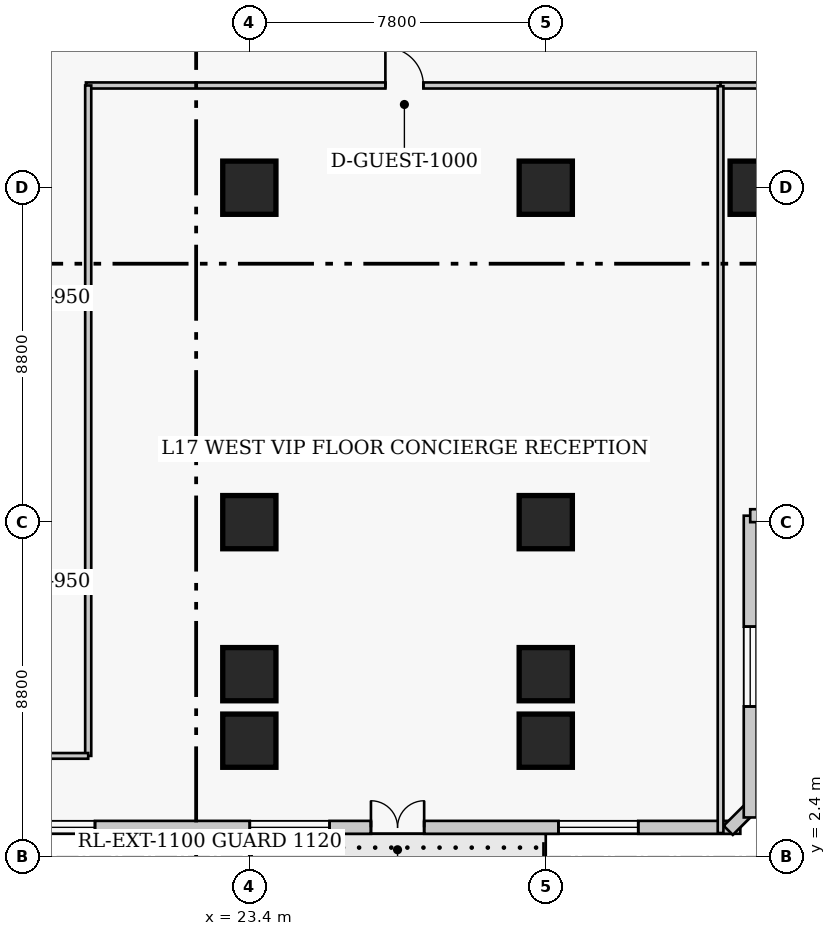
"""IFC4 building model, lengths in metres.
Left out: names, types, materials, properties, quantities, classifications, styles, units other than length and angle.
Written with IfcOpenShell. Run it as: python <this file> out.ifc"""

import sys

from ifc_helpers import new_model, si_unit, direction, frame, frame_2d, origin, origin_2d, place, context, subcontext, project, spatial, rectangle, extrude, element, fill, save


model = new_model("IFC4")
c1 = context("Model", 3, precision=1e-05, world=origin(), true_north=direction((0.0, 1.0)))
c2 = subcontext(c1, "Body", "Model", "MODEL_VIEW")
j1 = project(units=[si_unit("LENGTHUNIT", "METRE"), si_unit("PLANEANGLEUNIT", "RADIAN")], contexts=[c1])
p1 = place(None, origin())
s1 = spatial("IfcSite", under=j1, at=p1, CompositionType="ELEMENT")
p2 = place(p1, origin())
s2 = spatial("IfcBuilding", under=s1, at=p2, CompositionType="ELEMENT")
p3 = place(p2, frame((0.0, 0.0, 71.6)))
s3 = spatial("IfcBuildingStorey", under=s2, at=p3, CompositionType="ELEMENT", Elevation=71.6)
for number, where, z_axis, x_axis in (
    (1, (23.4, 11.2, 0.0), (0.0, 0.0, 1.0), (1.0, 0.0, 0.0)),
    (2, (23.4, 20.0, 0.0), (0.0, 0.0, 1.0), (1.0, 0.0, 0.0)),
    (3, (31.2, 11.2, 0.0), (0.0, 0.0, 1.0), (1.0, 0.0, 0.0)),
    (4, (31.2, 20.0, 0.0), (0.0, 0.0, 1.0), (1.0, 0.0, 0.0)),
    (5, (36.75, 20.0, 0.0), (0.0, 0.0, 1.0), (1.0, 0.0, 0.0)),
    (6, (23.4, 7.2, 0.0), (0.0, 0.0, 1.0), (1.0, 0.0, 0.0)),
    (7, (31.2, 7.2, 0.0), (0.0, 0.0, 1.0), (1.0, 0.0, 0.0)),
    (8, (23.4, 5.45, 0.0), (0.0, 0.0, 1.0), (1.0, 0.0, 0.0)),
    (9, (31.2, 5.45, 0.0), (0.0, 0.0, 1.0), (1.0, 0.0, 0.0)),
):
    element("IfcColumn", number, at=place(p3, frame(where, z_axis=z_axis, x_axis=x_axis)), inside=s3, PredefinedType="COLUMN", context=c2, shape_type="SweptSolid", body=[
        extrude(rectangle(XDim=1.4, YDim=1.4, at=origin_2d()), origin(), (0.0, 0.0, 1.0), 3.8),
    ])
p4 = place(p3, frame((6.43, 3.17, 0.0), z_axis=(0.0, 0.0, 1.0), x_axis=(1.0, 0.0, 0.0)))
e10 = element("IfcWall", 10, at=p4, inside=s3, PredefinedType="SOLIDWALL", context=c2, shape_type="SweptSolid", body=[
    extrude(rectangle(XDim=29.89, YDim=0.34, at=frame_2d((14.945, 0.0))), origin(), (0.0, 0.0, 1.0), 3.42),
])
p5 = place(p4, frame((20.17, 0.0, 0.0)))
e11 = element("IfcOpeningElement", 11, at=p5, cuts=e10, PredefinedType="OPENING", context=c2, shape_type="SweptSolid", body=[
    extrude(rectangle(XDim=1.4, YDim=2.15, at=frame_2d((0.7, 1.075))), frame((0.0, 0.18, 0.0), z_axis=(0.0, -1.0, 0.0), x_axis=(1.0, 0.0, 0.0)), (0.0, 0.0, 1.0), 0.36),
])
p6 = place(p4, frame((2.686, 0.0, 0.85)))
e12 = element("IfcOpeningElement", 12, at=p6, cuts=e10, PredefinedType="OPENING", context=c2, shape_type="SweptSolid", body=[
    extrude(rectangle(XDim=2.1, YDim=1.85, at=frame_2d((1.05, 0.925))), frame((0.0, 0.18, 0.0), z_axis=(0.0, -1.0, 0.0), x_axis=(1.0, 0.0, 0.0)), (0.0, 0.0, 1.0), 0.36),
])
p7 = place(p4, frame((10.809, 0.0, 0.85)))
e13 = element("IfcOpeningElement", 13, at=p7, cuts=e10, PredefinedType="OPENING", context=c2, shape_type="SweptSolid", body=[
    extrude(rectangle(XDim=2.1, YDim=1.85, at=frame_2d((1.05, 0.925))), frame((0.0, 0.18, 0.0), z_axis=(0.0, -1.0, 0.0), x_axis=(1.0, 0.0, 0.0)), (0.0, 0.0, 1.0), 0.36),
])
p8 = place(p4, frame((16.981, 0.0, 0.85)))
e14 = element("IfcOpeningElement", 14, at=p8, cuts=e10, PredefinedType="OPENING", context=c2, shape_type="SweptSolid", body=[
    extrude(rectangle(XDim=2.1, YDim=1.85, at=frame_2d((1.05, 0.925))), frame((0.0, 0.18, 0.0), z_axis=(0.0, -1.0, 0.0), x_axis=(1.0, 0.0, 0.0)), (0.0, 0.0, 1.0), 0.36),
])
p9 = place(p4, frame((25.104, 0.0, 0.85)))
e15 = element("IfcOpeningElement", 15, at=p9, cuts=e10, PredefinedType="OPENING", context=c2, shape_type="SweptSolid", body=[
    extrude(rectangle(XDim=2.1, YDim=1.85, at=frame_2d((1.05, 0.925))), frame((0.0, 0.18, 0.0), z_axis=(0.0, -1.0, 0.0), x_axis=(1.0, 0.0, 0.0)), (0.0, 0.0, 1.0), 0.36),
])
p10 = place(p3, frame((36.001, 3.092, 0.0), z_axis=(0.0, 0.0, 1.0), x_axis=(0.707106781187, 0.707106781187, 0.0)))
e16 = element("IfcWall", 16, at=p10, inside=s3, PredefinedType="SOLIDWALL", context=c2, shape_type="SweptSolid", body=[
    extrude(rectangle(XDim=0.929, YDim=0.34, at=frame_2d((0.464, 0.0))), origin(), (0.0, 0.0, 1.0), 3.42),
])
p11 = place(p3, frame((36.58, 3.43, 0.0), z_axis=(0.0, 0.0, 1.0), x_axis=(0.0, 1.0, 0.0)))
e17 = element("IfcWall", 17, at=p11, inside=s3, PredefinedType="SOLIDWALL", context=c2, shape_type="SweptSolid", body=[
    extrude(rectangle(XDim=7.94, YDim=0.34, at=frame_2d((3.97, 0.0))), origin(), (0.0, 0.0, 1.0), 3.42),
])
p12 = place(p11, frame((2.92, 0.0, 0.85)))
e18 = element("IfcOpeningElement", 18, at=p12, cuts=e17, PredefinedType="OPENING", context=c2, shape_type="SweptSolid", body=[
    extrude(rectangle(XDim=2.1, YDim=1.85, at=frame_2d((1.05, 0.925))), frame((0.0, 0.18, 0.0), z_axis=(0.0, -1.0, 0.0), x_axis=(1.0, 0.0, 0.0)), (0.0, 0.0, 1.0), 0.36),
])
p13 = place(p3, frame((36.58, 11.37, 0.0), z_axis=(0.0, 0.0, 1.0), x_axis=(1.0, 0.0, 0.0)))
e19 = element("IfcWall", 19, at=p13, inside=s3, PredefinedType="SOLIDWALL", context=c2, shape_type="SweptSolid", body=[
    extrude(rectangle(XDim=4.84, YDim=0.34, at=frame_2d((2.42, 0.0))), origin(), (0.0, 0.0, 1.0), 3.42),
])
p14 = place(p13, frame((1.37, 0.0, 0.85)))
e20 = element("IfcOpeningElement", 20, at=p14, cuts=e19, PredefinedType="OPENING", context=c2, shape_type="SweptSolid", body=[
    extrude(rectangle(XDim=2.1, YDim=1.85, at=frame_2d((1.05, 0.925))), frame((0.0, 0.18, 0.0), z_axis=(0.0, -1.0, 0.0), x_axis=(1.0, 0.0, 0.0)), (0.0, 0.0, 1.0), 0.36),
])
p15 = place(p3, frame((19.1, 22.69, 0.0), z_axis=(0.0, 0.0, 1.0), x_axis=(1.0, 0.0, 0.0)))
e21 = element("IfcWall", 21, at=p15, inside=s3, PredefinedType="PARTITIONING", context=c2, shape_type="SweptSolid", body=[
    extrude(rectangle(XDim=16.7, YDim=0.16, at=frame_2d((8.35, 0.0))), origin(), (0.0, 0.0, 1.0), 3.42),
])
p16 = place(p15, frame((7.88, 0.0, 0.0)))
e22 = element("IfcOpeningElement", 22, at=p16, cuts=e21, PredefinedType="OPENING", context=c2, shape_type="SweptSolid", body=[
    extrude(rectangle(XDim=1.0, YDim=2.15, at=frame_2d((0.5, 1.075))), frame((0.0, 0.09, 0.0), z_axis=(0.0, -1.0, 0.0), x_axis=(1.0, 0.0, 0.0)), (0.0, 0.0, 1.0), 0.18),
])
p17 = place(p3, frame((35.8, 22.69, 0.0), z_axis=(0.0, 0.0, 1.0), x_axis=(1.0, 0.0, 0.0)))
e23 = element("IfcWall", 23, at=p17, inside=s3, PredefinedType="PARTITIONING", context=c2, shape_type="SweptSolid", body=[
    extrude(rectangle(XDim=22.65, YDim=0.16, at=frame_2d((11.325, 0.0))), origin(), (0.0, 0.0, 1.0), 3.42),
])
p18 = place(p17, frame((2.115, 0.0, 0.0)))
e24 = element("IfcOpeningElement", 24, at=p18, cuts=e23, PredefinedType="OPENING", context=c2, shape_type="SweptSolid", body=[
    extrude(rectangle(XDim=0.95, YDim=2.1, at=frame_2d((0.475, 1.05))), frame((0.0, 0.09, 0.0), z_axis=(0.0, -1.0, 0.0), x_axis=(1.0, 0.0, 0.0)), (0.0, 0.0, 1.0), 0.18),
])
p19 = place(p17, frame((10.215, 0.0, 0.0)))
e25 = element("IfcOpeningElement", 25, at=p19, cuts=e23, PredefinedType="OPENING", context=c2, shape_type="SweptSolid", body=[
    extrude(rectangle(XDim=0.95, YDim=2.1, at=frame_2d((0.475, 1.05))), frame((0.0, 0.09, 0.0), z_axis=(0.0, -1.0, 0.0), x_axis=(1.0, 0.0, 0.0)), (0.0, 0.0, 1.0), 0.18),
])
p20 = place(p17, frame((18.6, 0.0, 0.0)))
e26 = element("IfcOpeningElement", 26, at=p20, cuts=e23, PredefinedType="OPENING", context=c2, shape_type="SweptSolid", body=[
    extrude(rectangle(XDim=1.0, YDim=2.15, at=frame_2d((0.5, 1.075))), frame((0.0, 0.09, 0.0), z_axis=(0.0, -1.0, 0.0), x_axis=(1.0, 0.0, 0.0)), (0.0, 0.0, 1.0), 0.18),
])
p21 = place(p3, frame((19.16, 5.05, 0.0), z_axis=(0.0, 0.0, 1.0), x_axis=(0.0, 1.0, 0.0)))
e27 = element("IfcWall", 27, at=p21, inside=s3, PredefinedType="PARTITIONING", context=c2, shape_type="SweptSolid", body=[
    extrude(rectangle(XDim=17.64, YDim=0.16, at=frame_2d((8.82, 0.0))), origin(), (0.0, 0.0, 1.0), 3.42),
])
p22 = place(p3, frame((16.94, 5.05, 0.0), z_axis=(0.0, 0.0, 1.0), x_axis=(1.0, 0.0, 0.0)))
e28 = element("IfcWall", 28, at=p22, inside=s3, PredefinedType="PARTITIONING", context=c2, shape_type="SweptSolid", body=[
    extrude(rectangle(XDim=2.22, YDim=0.15, at=frame_2d((1.11, 0.0))), origin(), (0.0, 0.0, 1.0), 3.42),
])
p23 = place(p3, frame((35.8, 3.02, 0.0), z_axis=(0.0, 0.0, 1.0), x_axis=(0.0, 1.0, 0.0)))
e29 = element("IfcWall", 29, at=p23, inside=s3, PredefinedType="PARTITIONING", context=c2, shape_type="SweptSolid", body=[
    extrude(rectangle(XDim=19.65, YDim=0.15, at=frame_2d((9.825, 0.0))), origin(), (0.0, 0.0, 1.0), 3.42),
])
p24 = place(p5, origin())
e30 = element("IfcDoor", 30, at=p24, inside=s3, OperationType="DOUBLE_DOOR_SINGLE_SWING", PredefinedType="DOOR", context=c2, shape_type="SweptSolid", body=[
    extrude(rectangle(XDim=1.4, YDim=2.15, at=frame_2d((0.7, 1.075))), frame((0.0, 0.025, 0.0), z_axis=(0.0, -1.0, 0.0), x_axis=(1.0, 0.0, 0.0)), (0.0, 0.0, 1.0), 0.05),
])
fill(e11, e30)
p25 = place(p7, origin())
e31 = element("IfcWindow", 31, at=p25, inside=s3, PartitioningType="SINGLE_PANEL", PredefinedType="WINDOW", context=c2, shape_type="SweptSolid", body=[
    extrude(rectangle(XDim=2.1, YDim=1.85, at=frame_2d((1.05, 0.925))), frame((0.0, 0.03, 0.0), z_axis=(0.0, -1.0, 0.0), x_axis=(1.0, 0.0, 0.0)), (0.0, 0.0, 1.0), 0.06),
])
fill(e13, e31)
p26 = place(p8, origin())
e32 = element("IfcWindow", 32, at=p26, inside=s3, PartitioningType="SINGLE_PANEL", PredefinedType="WINDOW", context=c2, shape_type="SweptSolid", body=[
    extrude(rectangle(XDim=2.1, YDim=1.85, at=frame_2d((1.05, 0.925))), frame((0.0, 0.03, 0.0), z_axis=(0.0, -1.0, 0.0), x_axis=(1.0, 0.0, 0.0)), (0.0, 0.0, 1.0), 0.06),
])
fill(e14, e32)
p27 = place(p9, origin())
e33 = element("IfcWindow", 33, at=p27, inside=s3, PartitioningType="SINGLE_PANEL", PredefinedType="WINDOW", context=c2, shape_type="SweptSolid", body=[
    extrude(rectangle(XDim=2.1, YDim=1.85, at=frame_2d((1.05, 0.925))), frame((0.0, 0.03, 0.0), z_axis=(0.0, -1.0, 0.0), x_axis=(1.0, 0.0, 0.0)), (0.0, 0.0, 1.0), 0.06),
])
fill(e15, e33)
p28 = place(p12, origin())
e34 = element("IfcWindow", 34, at=p28, inside=s3, PartitioningType="SINGLE_PANEL", PredefinedType="WINDOW", context=c2, shape_type="SweptSolid", body=[
    extrude(rectangle(XDim=2.1, YDim=1.85, at=frame_2d((1.05, 0.925))), frame((0.0, 0.03, 0.0), z_axis=(0.0, -1.0, 0.0), x_axis=(1.0, 0.0, 0.0)), (0.0, 0.0, 1.0), 0.06),
])
fill(e18, e34)
p29 = place(p16, origin())
e35 = element("IfcDoor", 35, at=p29, inside=s3, OperationType="SINGLE_SWING_LEFT", PredefinedType="DOOR", context=c2, shape_type="SweptSolid", body=[
    extrude(rectangle(XDim=1.0, YDim=2.15, at=frame_2d((0.5, 1.075))), frame((0.0, 0.025, 0.0), z_axis=(0.0, -1.0, 0.0), x_axis=(1.0, 0.0, 0.0)), (0.0, 0.0, 1.0), 0.05),
])
fill(e22, e35)
save(model, sys.argv[1])
